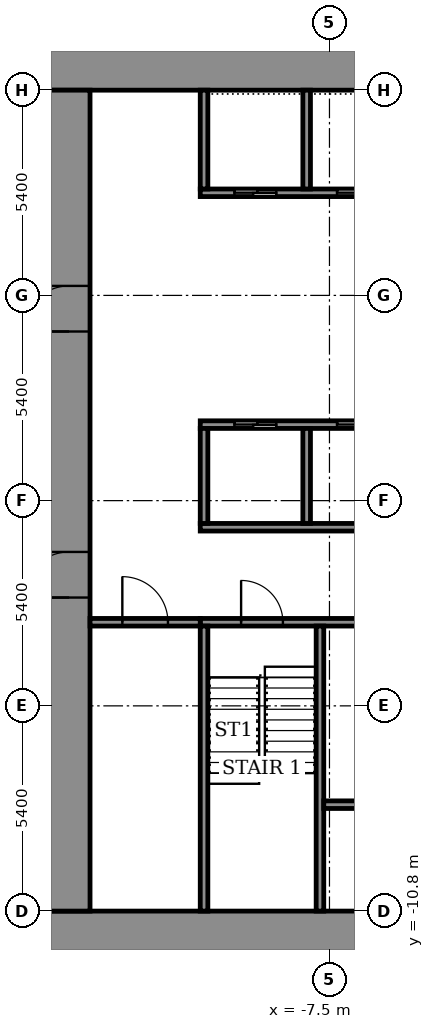
"""IFC4 building model, lengths in metres.
Left out: names, types, materials, properties, quantities, classifications, styles, units other than length and angle.
Written with IfcOpenShell. Run it as: python <this file> out.ifc"""

import sys

from ifc_helpers import new_model, si_unit, direction, frame, frame_2d, origin, place, context, subcontext, project, spatial, rectangle, extrude, element, fill, save


model = new_model("IFC4")
c1 = context("Model", 3, precision=1e-05, world=origin(), true_north=direction((0.0, 1.0)))
c2 = subcontext(c1, "Body", "Model", "MODEL_VIEW")
j1 = project(units=[si_unit("LENGTHUNIT", "METRE"), si_unit("PLANEANGLEUNIT", "RADIAN")], contexts=[c1])
p1 = place(None, origin())
s1 = spatial("IfcSite", under=j1, at=p1, CompositionType="ELEMENT")
p2 = place(p1, origin())
s2 = spatial("IfcBuilding", under=s1, at=p2, CompositionType="ELEMENT")
p3 = place(p2, frame((0.0, 0.0, 71.1)))
s3 = spatial("IfcBuildingStorey", under=s2, at=p3, CompositionType="ELEMENT", Elevation=71.1)
for number, where, z_axis, x_axis in (
    (1, (-14.9, -11.35, 0.0), (0.0, 0.0, 1.0), (1.0, 0.0, 0.0)),
    (2, (-14.9, 11.35, 0.0), (0.0, 0.0, 1.0), (1.0, 0.0, 0.0)),
):
    element("IfcWall", number, at=place(p3, frame(where, z_axis=z_axis, x_axis=x_axis)), inside=s3, PredefinedType="SHEAR", context=c2, shape_type="SweptSolid", body=[
        extrude(rectangle(XDim=29.8, YDim=1.1, at=frame_2d((14.9, 0.0))), origin(), (0.0, 0.0, 1.0), 3.6),
    ])
p4 = place(p3, frame((-14.35, -10.8, 0.0), z_axis=(0.0, 0.0, 1.0), x_axis=(0.0, 1.0, 0.0)))
e3 = element("IfcWall", 3, at=p4, inside=s3, PredefinedType="SHEAR", context=c2, shape_type="SweptSolid", body=[
    extrude(rectangle(XDim=21.6, YDim=1.1, at=frame_2d((10.8, 0.0))), origin(), (0.0, 0.0, 1.0), 3.6),
])
p5 = place(p4, frame((8.25, 0.0, 0.0)))
e4 = element("IfcOpeningElement", 4, at=p5, cuts=e3, PredefinedType="OPENING", context=c2, shape_type="SweptSolid", body=[
    extrude(rectangle(XDim=1.2, YDim=2.1, at=frame_2d((0.6, 1.05))), frame((0.0, 0.56, 0.0), z_axis=(0.0, -1.0, 0.0), x_axis=(1.0, 0.0, 0.0)), (0.0, 0.0, 1.0), 1.12),
])
p6 = place(p4, frame((15.25, 0.0, 0.0)))
e5 = element("IfcOpeningElement", 5, at=p6, cuts=e3, PredefinedType="OPENING", context=c2, shape_type="SweptSolid", body=[
    extrude(rectangle(XDim=1.2, YDim=2.1, at=frame_2d((0.6, 1.05))), frame((0.0, 0.56, 0.0), z_axis=(0.0, -1.0, 0.0), x_axis=(1.0, 0.0, 0.0)), (0.0, 0.0, 1.0), 1.12),
])
p7 = place(p3, frame((-10.9, -3.2, 0.0), z_axis=(0.0, 0.0, 1.0), x_axis=(1.0, 0.0, 0.0)))
e6 = element("IfcWall", 6, at=p7, inside=s3, PredefinedType="SHEAR", context=c2, shape_type="SweptSolid", body=[
    extrude(rectangle(XDim=21.8, YDim=0.2, at=frame_2d((10.9, 0.0))), origin(), (0.0, 0.0, 1.0), 3.05),
])
p8 = place(p7, frame((1.075, 0.0, 0.0)))
e7 = element("IfcOpeningElement", 7, at=p8, cuts=e6, PredefinedType="OPENING", context=c2, shape_type="SweptSolid", body=[
    extrude(rectangle(XDim=1.1, YDim=2.1, at=frame_2d((0.55, 1.05))), frame((0.0, 0.11, 0.0), z_axis=(0.0, -1.0, 0.0), x_axis=(1.0, 0.0, 0.0)), (0.0, 0.0, 1.0), 0.22),
])
p9 = place(p7, frame((10.325, 0.0, 0.0)))
e8 = element("IfcOpeningElement", 8, at=p9, cuts=e6, PredefinedType="OPENING", context=c2, shape_type="SweptSolid", body=[
    extrude(rectangle(XDim=1.1, YDim=2.1, at=frame_2d((0.55, 1.05))), frame((0.0, 0.11, 0.0), z_axis=(0.0, -1.0, 0.0), x_axis=(1.0, 0.0, 0.0)), (0.0, 0.0, 1.0), 0.22),
])
p10 = place(p7, frame((19.625, 0.0, 0.0)))
e9 = element("IfcOpeningElement", 9, at=p10, cuts=e6, PredefinedType="OPENING", context=c2, shape_type="SweptSolid", body=[
    extrude(rectangle(XDim=1.1, YDim=2.1, at=frame_2d((0.55, 1.05))), frame((0.0, 0.11, 0.0), z_axis=(0.0, -1.0, 0.0), x_axis=(1.0, 0.0, 0.0)), (0.0, 0.0, 1.0), 0.22),
])
p11 = place(p7, frame((5.7, 0.0, 0.0)))
e10 = element("IfcOpeningElement", 10, at=p11, cuts=e6, PredefinedType="OPENING", context=c2, shape_type="SweptSolid", body=[
    extrude(rectangle(XDim=1.1, YDim=2.1, at=frame_2d((0.55, 1.05))), frame((0.0, 0.11, 0.0), z_axis=(0.0, -1.0, 0.0), x_axis=(1.0, 0.0, 0.0)), (0.0, 0.0, 1.0), 0.22),
])
p12 = place(p7, frame((14.975, 0.0, 0.0)))
e11 = element("IfcOpeningElement", 11, at=p12, cuts=e6, PredefinedType="OPENING", context=c2, shape_type="SweptSolid", body=[
    extrude(rectangle(XDim=1.1, YDim=2.1, at=frame_2d((0.55, 1.05))), frame((0.0, 0.11, 0.0), z_axis=(0.0, -1.0, 0.0), x_axis=(1.0, 0.0, 0.0)), (0.0, 0.0, 1.0), 0.22),
])
p13 = place(p3, frame((-10.9, -0.7, 0.0), z_axis=(0.0, 0.0, 1.0), x_axis=(1.0, 0.0, 0.0)))
e12 = element("IfcWall", 12, at=p13, inside=s3, PredefinedType="SHEAR", context=c2, shape_type="SweptSolid", body=[
    extrude(rectangle(XDim=21.8, YDim=0.2, at=frame_2d((10.9, 0.0))), origin(), (0.0, 0.0, 1.0), 3.05),
])
p14 = place(p3, frame((-10.9, 2.0, 0.0), z_axis=(0.0, 0.0, 1.0), x_axis=(1.0, 0.0, 0.0)))
e13 = element("IfcWall", 13, at=p14, inside=s3, PredefinedType="SHEAR", context=c2, shape_type="SweptSolid", body=[
    extrude(rectangle(XDim=21.8, YDim=0.2, at=frame_2d((10.9, 0.0))), origin(), (0.0, 0.0, 1.0), 3.05),
])
p15 = place(p14, frame((0.9, 0.0, 0.0)))
e14 = element("IfcOpeningElement", 14, at=p15, cuts=e13, PredefinedType="OPENING", context=c2, shape_type="SweptSolid", body=[
    extrude(rectangle(XDim=1.1, YDim=2.1, at=frame_2d((0.55, 1.05))), frame((0.0, 0.11, 0.0), z_axis=(0.0, -1.0, 0.0), x_axis=(1.0, 0.0, 0.0)), (0.0, 0.0, 1.0), 0.22),
])
p16 = place(p14, frame((3.6, 0.0, 0.0)))
e15 = element("IfcOpeningElement", 15, at=p16, cuts=e13, PredefinedType="OPENING", context=c2, shape_type="SweptSolid", body=[
    extrude(rectangle(XDim=1.1, YDim=2.1, at=frame_2d((0.55, 1.05))), frame((0.0, 0.11, 0.0), z_axis=(0.0, -1.0, 0.0), x_axis=(1.0, 0.0, 0.0)), (0.0, 0.0, 1.0), 0.22),
])
p17 = place(p14, frame((6.3, 0.0, 0.0)))
e16 = element("IfcOpeningElement", 16, at=p17, cuts=e13, PredefinedType="OPENING", context=c2, shape_type="SweptSolid", body=[
    extrude(rectangle(XDim=1.1, YDim=2.1, at=frame_2d((0.55, 1.05))), frame((0.0, 0.11, 0.0), z_axis=(0.0, -1.0, 0.0), x_axis=(1.0, 0.0, 0.0)), (0.0, 0.0, 1.0), 0.22),
])
p18 = place(p14, frame((9.0, 0.0, 0.0)))
e17 = element("IfcOpeningElement", 17, at=p18, cuts=e13, PredefinedType="OPENING", context=c2, shape_type="SweptSolid", body=[
    extrude(rectangle(XDim=1.1, YDim=2.1, at=frame_2d((0.55, 1.05))), frame((0.0, 0.11, 0.0), z_axis=(0.0, -1.0, 0.0), x_axis=(1.0, 0.0, 0.0)), (0.0, 0.0, 1.0), 0.22),
])
p19 = place(p14, frame((11.7, 0.0, 0.0)))
e18 = element("IfcOpeningElement", 18, at=p19, cuts=e13, PredefinedType="OPENING", context=c2, shape_type="SweptSolid", body=[
    extrude(rectangle(XDim=1.1, YDim=2.1, at=frame_2d((0.55, 1.05))), frame((0.0, 0.11, 0.0), z_axis=(0.0, -1.0, 0.0), x_axis=(1.0, 0.0, 0.0)), (0.0, 0.0, 1.0), 0.22),
])
p20 = place(p14, frame((15.85, 0.0, 0.0)))
e19 = element("IfcOpeningElement", 19, at=p20, cuts=e13, PredefinedType="OPENING", context=c2, shape_type="SweptSolid", body=[
    extrude(rectangle(XDim=0.9, YDim=2.1, at=frame_2d((0.45, 1.05))), frame((0.0, 0.11, 0.0), z_axis=(0.0, -1.0, 0.0), x_axis=(1.0, 0.0, 0.0)), (0.0, 0.0, 1.0), 0.22),
])
p21 = place(p14, frame((19.9, 0.0, 0.0)))
e20 = element("IfcOpeningElement", 20, at=p21, cuts=e13, PredefinedType="OPENING", context=c2, shape_type="SweptSolid", body=[
    extrude(rectangle(XDim=0.9, YDim=2.1, at=frame_2d((0.45, 1.05))), frame((0.0, 0.11, 0.0), z_axis=(0.0, -1.0, 0.0), x_axis=(1.0, 0.0, 0.0)), (0.0, 0.0, 1.0), 0.22),
])
p22 = place(p3, frame((-10.9, 8.1, 0.0), z_axis=(0.0, 0.0, 1.0), x_axis=(1.0, 0.0, 0.0)))
e21 = element("IfcWall", 21, at=p22, inside=s3, PredefinedType="SHEAR", context=c2, shape_type="SweptSolid", body=[
    extrude(rectangle(XDim=21.8, YDim=0.2, at=frame_2d((10.9, 0.0))), origin(), (0.0, 0.0, 1.0), 3.05),
])
p23 = place(p22, frame((0.9, 0.0, 0.0)))
e22 = element("IfcOpeningElement", 22, at=p23, cuts=e21, PredefinedType="OPENING", context=c2, shape_type="SweptSolid", body=[
    extrude(rectangle(XDim=1.1, YDim=2.1, at=frame_2d((0.55, 1.05))), frame((0.0, 0.11, 0.0), z_axis=(0.0, -1.0, 0.0), x_axis=(1.0, 0.0, 0.0)), (0.0, 0.0, 1.0), 0.22),
])
p24 = place(p22, frame((3.6, 0.0, 0.0)))
e23 = element("IfcOpeningElement", 23, at=p24, cuts=e21, PredefinedType="OPENING", context=c2, shape_type="SweptSolid", body=[
    extrude(rectangle(XDim=1.1, YDim=2.1, at=frame_2d((0.55, 1.05))), frame((0.0, 0.11, 0.0), z_axis=(0.0, -1.0, 0.0), x_axis=(1.0, 0.0, 0.0)), (0.0, 0.0, 1.0), 0.22),
])
p25 = place(p22, frame((6.3, 0.0, 0.0)))
e24 = element("IfcOpeningElement", 24, at=p25, cuts=e21, PredefinedType="OPENING", context=c2, shape_type="SweptSolid", body=[
    extrude(rectangle(XDim=1.1, YDim=2.1, at=frame_2d((0.55, 1.05))), frame((0.0, 0.11, 0.0), z_axis=(0.0, -1.0, 0.0), x_axis=(1.0, 0.0, 0.0)), (0.0, 0.0, 1.0), 0.22),
])
p26 = place(p22, frame((9.0, 0.0, 0.0)))
e25 = element("IfcOpeningElement", 25, at=p26, cuts=e21, PredefinedType="OPENING", context=c2, shape_type="SweptSolid", body=[
    extrude(rectangle(XDim=1.1, YDim=2.1, at=frame_2d((0.55, 1.05))), frame((0.0, 0.11, 0.0), z_axis=(0.0, -1.0, 0.0), x_axis=(1.0, 0.0, 0.0)), (0.0, 0.0, 1.0), 0.22),
])
p27 = place(p22, frame((11.7, 0.0, 0.0)))
e26 = element("IfcOpeningElement", 26, at=p27, cuts=e21, PredefinedType="OPENING", context=c2, shape_type="SweptSolid", body=[
    extrude(rectangle(XDim=1.1, YDim=2.1, at=frame_2d((0.55, 1.05))), frame((0.0, 0.11, 0.0), z_axis=(0.0, -1.0, 0.0), x_axis=(1.0, 0.0, 0.0)), (0.0, 0.0, 1.0), 0.22),
])
p28 = place(p22, frame((17.2, 0.0, 0.0)))
e27 = element("IfcOpeningElement", 27, at=p28, cuts=e21, PredefinedType="OPENING", context=c2, shape_type="SweptSolid", body=[
    extrude(rectangle(XDim=0.9, YDim=2.1, at=frame_2d((0.45, 1.05))), frame((0.0, 0.11, 0.0), z_axis=(0.0, -1.0, 0.0), x_axis=(1.0, 0.0, 0.0)), (0.0, 0.0, 1.0), 0.22),
])
for number, where, z_axis, x_axis in (
    (28, (-10.8, -10.8, 0.0), (0.0, 0.0, 1.0), (0.0, 1.0, 0.0)),
    (29, (-7.75, -10.8, 0.0), (0.0, 0.0, 1.0), (0.0, 1.0, 0.0)),
):
    element("IfcWall", number, at=place(p3, frame(where, z_axis=z_axis, x_axis=x_axis)), inside=s3, PredefinedType="SHEAR", context=c2, shape_type="SweptSolid", body=[
        extrude(rectangle(XDim=7.5, YDim=0.2, at=frame_2d((3.75, 0.0))), origin(), (0.0, 0.0, 1.0), 3.05),
    ])
p29 = place(p3, frame((-7.65, -8.0, 0.0), z_axis=(0.0, 0.0, 1.0), x_axis=(1.0, 0.0, 0.0)))
e30 = element("IfcWall", 30, at=p29, inside=s3, PredefinedType="SHEAR", context=c2, shape_type="SweptSolid", body=[
    extrude(rectangle(XDim=6.0, YDim=0.2, at=frame_2d((3.0, 0.0))), origin(), (0.0, 0.0, 1.0), 3.05),
])
p30 = place(p29, frame((0.9, 0.0, 0.0)))
e31 = element("IfcOpeningElement", 31, at=p30, cuts=e30, PredefinedType="OPENING", context=c2, shape_type="SweptSolid", body=[
    extrude(rectangle(XDim=1.1, YDim=2.1, at=frame_2d((0.55, 1.05))), frame((0.0, 0.11, 0.0), z_axis=(0.0, -1.0, 0.0), x_axis=(1.0, 0.0, 0.0)), (0.0, 0.0, 1.0), 0.22),
])
p31 = place(p29, frame((4.0, 0.0, 0.0)))
e32 = element("IfcOpeningElement", 32, at=p31, cuts=e30, PredefinedType="OPENING", context=c2, shape_type="SweptSolid", body=[
    extrude(rectangle(XDim=1.1, YDim=2.1, at=frame_2d((0.55, 1.05))), frame((0.0, 0.11, 0.0), z_axis=(0.0, -1.0, 0.0), x_axis=(1.0, 0.0, 0.0)), (0.0, 0.0, 1.0), 0.22),
])
for number, where, z_axis, x_axis in (
    (33, (-10.8, -0.6, 0.0), (0.0, 0.0, 1.0), (0.0, 1.0, 0.0)),
    (34, (-8.1, -0.6, 0.0), (0.0, 0.0, 1.0), (0.0, 1.0, 0.0)),
):
    element("IfcWall", number, at=place(p3, frame(where, z_axis=z_axis, x_axis=x_axis)), inside=s3, PredefinedType="SHEAR", context=c2, shape_type="SweptSolid", body=[
        extrude(rectangle(XDim=2.5, YDim=0.2, at=frame_2d((1.25, 0.0))), origin(), (0.0, 0.0, 1.0), 3.05),
    ])
for number, where, z_axis, x_axis in (
    (35, (-10.8, 8.2, 0.0), (0.0, 0.0, 1.0), (0.0, 1.0, 0.0)),
    (36, (-8.1, 8.2, 0.0), (0.0, 0.0, 1.0), (0.0, 1.0, 0.0)),
):
    element("IfcWall", number, at=place(p3, frame(where, z_axis=z_axis, x_axis=x_axis)), inside=s3, PredefinedType="SHEAR", context=c2, shape_type="SweptSolid", body=[
        extrude(rectangle(XDim=2.6, YDim=0.2, at=frame_2d((1.3, 0.0))), origin(), (0.0, 0.0, 1.0), 3.05),
    ])
p32 = place(p3, frame((-13.8, -3.2, 0.0), z_axis=(0.0, 0.0, 1.0), x_axis=(1.0, 0.0, 0.0)))
e37 = element("IfcWall", 37, at=p32, inside=s3, PredefinedType="STANDARD", context=c2, shape_type="SweptSolid", body=[
    extrude(rectangle(XDim=2.9, YDim=0.2, at=frame_2d((1.45, 0.0))), origin(), (0.0, 0.0, 1.0), 3.05),
])
p33 = place(p32, frame((0.85, 0.0, 0.0)))
e38 = element("IfcOpeningElement", 38, at=p33, cuts=e37, PredefinedType="OPENING", context=c2, shape_type="SweptSolid", body=[
    extrude(rectangle(XDim=1.2, YDim=2.1, at=frame_2d((0.6, 1.05))), frame((0.0, 0.11, 0.0), z_axis=(0.0, -1.0, 0.0), x_axis=(1.0, 0.0, 0.0)), (0.0, 0.0, 1.0), 0.22),
])
p34 = place(p5, origin())
e39 = element("IfcDoor", 39, at=p34, inside=s3, OperationType="DOUBLE_DOOR_SINGLE_SWING", PredefinedType="DOOR", context=c2, shape_type="SweptSolid", body=[
    extrude(rectangle(XDim=1.2, YDim=2.1, at=frame_2d((0.6, 1.05))), frame((0.0, 0.025, 0.0), z_axis=(0.0, -1.0, 0.0), x_axis=(1.0, 0.0, 0.0)), (0.0, 0.0, 1.0), 0.05),
])
fill(e4, e39)
p35 = place(p6, origin())
e40 = element("IfcDoor", 40, at=p35, inside=s3, OperationType="DOUBLE_DOOR_SINGLE_SWING", PredefinedType="DOOR", context=c2, shape_type="SweptSolid", body=[
    extrude(rectangle(XDim=1.2, YDim=2.1, at=frame_2d((0.6, 1.05))), frame((0.0, 0.025, 0.0), z_axis=(0.0, -1.0, 0.0), x_axis=(1.0, 0.0, 0.0)), (0.0, 0.0, 1.0), 0.05),
])
fill(e5, e40)
p36 = place(p15, origin())
e41 = element("IfcDoor", 41, at=p36, inside=s3, OperationType="SLIDING_TO_LEFT", PredefinedType="DOOR", context=c2, shape_type="SweptSolid", body=[
    extrude(rectangle(XDim=1.1, YDim=2.1, at=frame_2d((0.55, 1.05))), frame((0.0, 0.025, 0.0), z_axis=(0.0, -1.0, 0.0), x_axis=(1.0, 0.0, 0.0)), (0.0, 0.0, 1.0), 0.05),
])
fill(e14, e41)
p37 = place(p16, origin())
e42 = element("IfcDoor", 42, at=p37, inside=s3, OperationType="SLIDING_TO_LEFT", PredefinedType="DOOR", context=c2, shape_type="SweptSolid", body=[
    extrude(rectangle(XDim=1.1, YDim=2.1, at=frame_2d((0.55, 1.05))), frame((0.0, 0.025, 0.0), z_axis=(0.0, -1.0, 0.0), x_axis=(1.0, 0.0, 0.0)), (0.0, 0.0, 1.0), 0.05),
])
fill(e15, e42)
p38 = place(p23, origin())
e43 = element("IfcDoor", 43, at=p38, inside=s3, OperationType="SLIDING_TO_LEFT", PredefinedType="DOOR", context=c2, shape_type="SweptSolid", body=[
    extrude(rectangle(XDim=1.1, YDim=2.1, at=frame_2d((0.55, 1.05))), frame((0.0, 0.025, 0.0), z_axis=(0.0, -1.0, 0.0), x_axis=(1.0, 0.0, 0.0)), (0.0, 0.0, 1.0), 0.05),
])
fill(e22, e43)
p39 = place(p24, origin())
e44 = element("IfcDoor", 44, at=p39, inside=s3, OperationType="SLIDING_TO_LEFT", PredefinedType="DOOR", context=c2, shape_type="SweptSolid", body=[
    extrude(rectangle(XDim=1.1, YDim=2.1, at=frame_2d((0.55, 1.05))), frame((0.0, 0.025, 0.0), z_axis=(0.0, -1.0, 0.0), x_axis=(1.0, 0.0, 0.0)), (0.0, 0.0, 1.0), 0.05),
])
fill(e23, e44)
p40 = place(p8, origin())
e45 = element("IfcDoor", 45, at=p40, inside=s3, OperationType="SINGLE_SWING_RIGHT", PredefinedType="DOOR", context=c2, shape_type="SweptSolid", body=[
    extrude(rectangle(XDim=1.1, YDim=2.1, at=frame_2d((0.55, 1.05))), frame((0.0, 0.025, 0.0), z_axis=(0.0, -1.0, 0.0), x_axis=(1.0, 0.0, 0.0)), (0.0, 0.0, 1.0), 0.05),
])
fill(e7, e45)
p41 = place(p33, origin())
e46 = element("IfcDoor", 46, at=p41, inside=s3, OperationType="SINGLE_SWING_LEFT", PredefinedType="DOOR", context=c2, shape_type="SweptSolid", body=[
    extrude(rectangle(XDim=1.2, YDim=2.1, at=frame_2d((0.6, 1.05))), frame((0.0, 0.025, 0.0), z_axis=(0.0, -1.0, 0.0), x_axis=(1.0, 0.0, 0.0)), (0.0, 0.0, 1.0), 0.05),
])
fill(e38, e46)
save(model, sys.argv[1])
